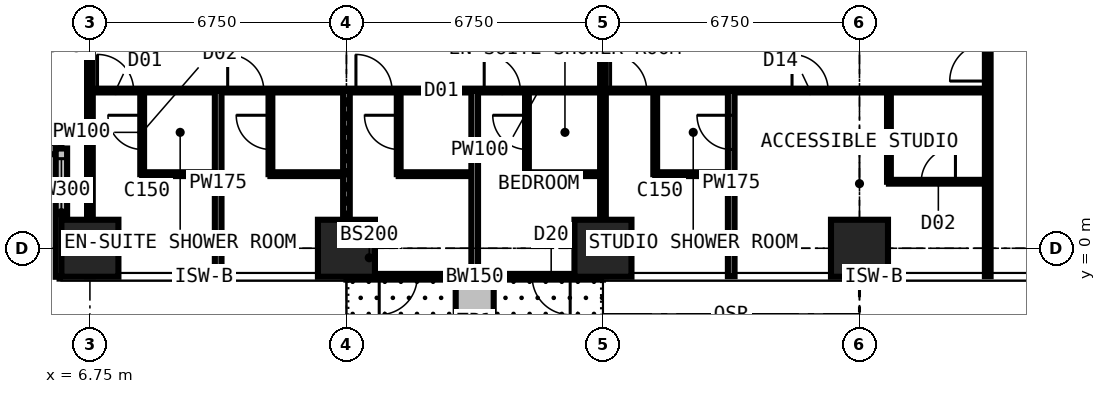
"""IFC4 building model, lengths in metres.
Left out: names, types, materials, properties, quantities, classifications, styles, units other than length and angle.
Written with IfcOpenShell. Run it as: python <this file> out.ifc"""

import sys

from ifc_helpers import new_model, si_unit, direction, frame, frame_2d, origin, origin_2d, place, context, subcontext, project, spatial, rectangle, extrude, element, fill, save


model = new_model("IFC4")
c1 = context("Model", 3, precision=1e-05, world=origin(), true_north=direction((0.0, 1.0)))
c2 = subcontext(c1, "Body", "Model", "MODEL_VIEW")
j1 = project(units=[si_unit("LENGTHUNIT", "METRE"), si_unit("PLANEANGLEUNIT", "RADIAN")], contexts=[c1])
p1 = place(None, origin())
s1 = spatial("IfcSite", under=j1, at=p1, CompositionType="ELEMENT")
p2 = place(p1, origin())
s2 = spatial("IfcBuilding", under=s1, at=p2, CompositionType="ELEMENT")
p3 = place(p2, frame((0.0, 0.0, 116.1)))
s3 = spatial("IfcBuildingStorey", under=s2, at=p3, CompositionType="ELEMENT", Elevation=116.1)
for number, where, z_axis, x_axis in (
    (1, (6.75, 0.0, 0.0), (0.0, 0.0, 1.0), (1.0, 0.0, 0.0)),
    (2, (13.5, 0.0, 0.0), (0.0, 0.0, 1.0), (1.0, 0.0, 0.0)),
    (3, (20.25, 0.0, 0.0), (0.0, 0.0, 1.0), (1.0, 0.0, 0.0)),
    (4, (27.0, 0.0, 0.0), (0.0, 0.0, 1.0), (1.0, 0.0, 0.0)),
):
    element("IfcColumn", number, at=place(p3, frame(where, z_axis=z_axis, x_axis=x_axis)), inside=s3, PredefinedType="COLUMN", context=c2, shape_type="SweptSolid", body=[
        extrude(rectangle(XDim=1.5, YDim=1.5, at=origin_2d()), origin(), (0.0, 0.0, 1.0), 3.6),
    ])
p4 = place(p3, frame((2.625, 2.625, 0.0), z_axis=(0.0, 0.0, 1.0), x_axis=(1.0, 0.0, 0.0)))
e5 = element("IfcWall", 5, at=p4, inside=s3, PredefinedType="SOLIDWALL", context=c2, shape_type="SweptSolid", body=[
    extrude(rectangle(XDim=3.375, YDim=0.3, at=frame_2d((1.688, 0.0))), origin(), (0.0, 0.0, 1.0), 3.375),
])
p5 = place(p4, frame((0.788, 0.0, 0.6)))
e6 = element("IfcOpeningElement", 6, at=p5, cuts=e5, PredefinedType="OPENING", context=c2, shape_type="SweptSolid", body=[
    extrude(rectangle(XDim=1.8, YDim=2.1, at=frame_2d((0.9, 1.05))), frame((0.0, 0.16, 0.0), z_axis=(0.0, -1.0, 0.0), x_axis=(1.0, 0.0, 0.0)), (0.0, 0.0, 1.0), 0.32),
])
p6 = place(p3, frame((6.0, 2.625, 0.0), z_axis=(0.0, 0.0, 1.0), x_axis=(0.0, -1.0, 0.0)))
e7 = element("IfcWall", 7, at=p6, inside=s3, PredefinedType="SOLIDWALL", context=c2, shape_type="SweptSolid", body=[
    extrude(rectangle(XDim=3.375, YDim=0.3, at=frame_2d((1.688, 0.0))), origin(), (0.0, 0.0, 1.0), 3.375),
])
p7 = place(p6, frame((0.268, 0.0, 0.9)))
e8 = element("IfcOpeningElement", 8, at=p7, cuts=e7, PredefinedType="OPENING", context=c2, shape_type="SweptSolid", body=[
    extrude(rectangle(XDim=1.5, YDim=1.8, at=frame_2d((0.75, 0.9))), frame((0.0, 0.16, 0.0), z_axis=(0.0, -1.0, 0.0), x_axis=(1.0, 0.0, 0.0)), (0.0, 0.0, 1.0), 0.32),
])
p8 = place(p3, frame((20.25, -0.75, 0.0), z_axis=(0.0, 0.0, 1.0), x_axis=(-1.0, 0.0, 0.0)))
e9 = element("IfcWall", 9, at=p8, inside=s3, PredefinedType="SOLIDWALL", context=c2, shape_type="SweptSolid", body=[
    extrude(rectangle(XDim=6.75, YDim=0.15, at=frame_2d((3.375, 0.0))), origin(), (0.0, 0.0, 1.0), 3.375),
])
p9 = place(p8, frame((0.863, 0.0, 0.0)))
e10 = element("IfcOpeningElement", 10, at=p9, cuts=e9, PredefinedType="OPENING", context=c2, shape_type="SweptSolid", body=[
    extrude(rectangle(XDim=1.0, YDim=2.2, at=frame_2d((0.5, 1.1))), frame((0.0, 0.085, 0.0), z_axis=(0.0, -1.0, 0.0), x_axis=(1.0, 0.0, 0.0)), (0.0, 0.0, 1.0), 0.17),
])
p10 = place(p8, frame((1.975, 0.0, 0.9)))
e11 = element("IfcOpeningElement", 11, at=p10, cuts=e9, PredefinedType="OPENING", context=c2, shape_type="SweptSolid", body=[
    extrude(rectangle(XDim=1.2, YDim=1.8, at=frame_2d((0.6, 0.9))), frame((0.0, 0.085, 0.0), z_axis=(0.0, -1.0, 0.0), x_axis=(1.0, 0.0, 0.0)), (0.0, 0.0, 1.0), 0.17),
])
p11 = place(p8, frame((4.887, 0.0, 0.0)))
e12 = element("IfcOpeningElement", 12, at=p11, cuts=e9, PredefinedType="OPENING", context=c2, shape_type="SweptSolid", body=[
    extrude(rectangle(XDim=1.0, YDim=2.2, at=frame_2d((0.5, 1.1))), frame((0.0, 0.085, 0.0), z_axis=(0.0, -1.0, 0.0), x_axis=(1.0, 0.0, 0.0)), (0.0, 0.0, 1.0), 0.17),
])
p12 = place(p8, frame((3.575, 0.0, 0.9)))
e13 = element("IfcOpeningElement", 13, at=p12, cuts=e9, PredefinedType="OPENING", context=c2, shape_type="SweptSolid", body=[
    extrude(rectangle(XDim=1.2, YDim=1.8, at=frame_2d((0.6, 0.9))), frame((0.0, 0.085, 0.0), z_axis=(0.0, -1.0, 0.0), x_axis=(1.0, 0.0, 0.0)), (0.0, 0.0, 1.0), 0.17),
])
p13 = place(p3, frame((16.875, -0.85, 0.0), z_axis=(0.0, 0.0, 1.0), x_axis=(0.0, -1.0, 0.0)))
e14 = element("IfcWall", 14, at=p13, inside=s3, PredefinedType="USERDEFINED", context=c2, shape_type="SweptSolid", body=[
    extrude(rectangle(XDim=2.2, YDim=1.0, at=frame_2d((1.1, 0.0))), origin(), (0.0, 0.0, 1.0), 0.9),
])
p14 = place(p3, frame((6.75, -0.734, 0.0), z_axis=(0.0, 0.0, 1.0), x_axis=(0.0, 1.0, 0.0)))
e15 = element("IfcWall", 15, at=p14, inside=s3, PredefinedType="PARTITIONING", context=c2, shape_type="SweptSolid", body=[
    extrude(rectangle(XDim=10.859, YDim=0.15, at=frame_2d((5.429, 0.0))), origin(), (0.0, 0.0, 1.0), 2.877),
])
p15 = place(p3, frame((6.75, 4.15, 0.0), z_axis=(0.0, 0.0, 1.0), x_axis=(1.0, 0.0, 0.0)))
e16 = element("IfcWall", 16, at=p15, inside=s3, PredefinedType="PARTITIONING", context=c2, shape_type="SweptSolid", body=[
    extrude(rectangle(XDim=23.625, YDim=0.1, at=frame_2d((11.812, 0.0))), origin(), (0.0, 0.0, 1.0), 3.375),
])
p16 = place(p15, frame((0.2, 0.0, 0.0)))
e17 = element("IfcOpeningElement", 17, at=p16, cuts=e16, PredefinedType="OPENING", context=c2, shape_type="SweptSolid", body=[
    extrude(rectangle(XDim=0.95, YDim=2.2, at=frame_2d((0.475, 1.1))), frame((0.0, 0.06, 0.0), z_axis=(0.0, -1.0, 0.0), x_axis=(1.0, 0.0, 0.0)), (0.0, 0.0, 1.0), 0.12),
])
p17 = place(p15, frame((3.625, 0.0, 0.0)))
e18 = element("IfcOpeningElement", 18, at=p17, cuts=e16, PredefinedType="OPENING", context=c2, shape_type="SweptSolid", body=[
    extrude(rectangle(XDim=0.95, YDim=2.2, at=frame_2d((0.475, 1.1))), frame((0.0, 0.06, 0.0), z_axis=(0.0, -1.0, 0.0), x_axis=(1.0, 0.0, 0.0)), (0.0, 0.0, 1.0), 0.12),
])
p18 = place(p15, frame((7.0, 0.0, 0.0)))
e19 = element("IfcOpeningElement", 19, at=p18, cuts=e16, PredefinedType="OPENING", context=c2, shape_type="SweptSolid", body=[
    extrude(rectangle(XDim=0.95, YDim=2.2, at=frame_2d((0.475, 1.1))), frame((0.0, 0.06, 0.0), z_axis=(0.0, -1.0, 0.0), x_axis=(1.0, 0.0, 0.0)), (0.0, 0.0, 1.0), 0.12),
])
p19 = place(p15, frame((10.375, 0.0, 0.0)))
e20 = element("IfcOpeningElement", 20, at=p19, cuts=e16, PredefinedType="OPENING", context=c2, shape_type="SweptSolid", body=[
    extrude(rectangle(XDim=0.95, YDim=2.2, at=frame_2d((0.475, 1.1))), frame((0.0, 0.06, 0.0), z_axis=(0.0, -1.0, 0.0), x_axis=(1.0, 0.0, 0.0)), (0.0, 0.0, 1.0), 0.12),
])
p20 = place(p15, frame((18.475, 0.0, 0.0)))
e21 = element("IfcOpeningElement", 21, at=p20, cuts=e16, PredefinedType="OPENING", context=c2, shape_type="SweptSolid", body=[
    extrude(rectangle(XDim=0.95, YDim=2.2, at=frame_2d((0.475, 1.1))), frame((0.0, 0.06, 0.0), z_axis=(0.0, -1.0, 0.0), x_axis=(1.0, 0.0, 0.0)), (0.0, 0.0, 1.0), 0.12),
])
p21 = place(p15, frame((13.7, 0.0, 0.0)))
e22 = element("IfcOpeningElement", 22, at=p21, cuts=e16, PredefinedType="OPENING", context=c2, shape_type="SweptSolid", body=[
    extrude(rectangle(XDim=0.95, YDim=2.2, at=frame_2d((0.475, 1.1))), frame((0.0, 0.06, 0.0), z_axis=(0.0, -1.0, 0.0), x_axis=(1.0, 0.0, 0.0)), (0.0, 0.0, 1.0), 0.12),
])
p22 = place(p3, frame((8.125, 1.95, 0.0), z_axis=(0.0, 0.0, 1.0), x_axis=(0.0, 1.0, 0.0)))
e23 = element("IfcWall", 23, at=p22, inside=s3, PredefinedType="PARTITIONING", context=c2, shape_type="SweptSolid", body=[
    extrude(rectangle(XDim=2.2, YDim=0.1, at=frame_2d((1.1, 0.0))), origin(), (0.0, 0.0, 1.0), 3.375),
])
p23 = place(p22, frame((0.65, 0.0, 0.0)))
e24 = element("IfcOpeningElement", 24, at=p23, cuts=e23, PredefinedType="OPENING", context=c2, shape_type="SweptSolid", body=[
    extrude(rectangle(XDim=0.9, YDim=2.2, at=frame_2d((0.45, 1.1))), frame((0.0, 0.06, 0.0), z_axis=(0.0, -1.0, 0.0), x_axis=(1.0, 0.0, 0.0)), (0.0, 0.0, 1.0), 0.12),
])
p24 = place(p3, frame((8.125, 1.95, 0.0), z_axis=(0.0, 0.0, 1.0), x_axis=(1.0, 0.0, 0.0)))
e25 = element("IfcWall", 25, at=p24, inside=s3, PredefinedType="PARTITIONING", context=c2, shape_type="SweptSolid", body=[
    extrude(rectangle(XDim=2.0, YDim=0.1, at=frame_2d((1.0, 0.0))), origin(), (0.0, 0.0, 1.0), 3.375),
])
p25 = place(p3, frame((10.125, -0.734, 0.0), z_axis=(0.0, 0.0, 1.0), x_axis=(0.0, 1.0, 0.0)))
e26 = element("IfcWall", 26, at=p25, inside=s3, PredefinedType="PARTITIONING", context=c2, shape_type="SweptSolid", body=[
    extrude(rectangle(XDim=4.884, YDim=0.175, at=frame_2d((2.442, 0.0))), origin(), (0.0, 0.0, 1.0), 3.375),
])
p26 = place(p3, frame((11.5, 1.95, 0.0), z_axis=(0.0, 0.0, 1.0), x_axis=(0.0, 1.0, 0.0)))
e27 = element("IfcWall", 27, at=p26, inside=s3, PredefinedType="PARTITIONING", context=c2, shape_type="SweptSolid", body=[
    extrude(rectangle(XDim=2.2, YDim=0.1, at=frame_2d((1.1, 0.0))), origin(), (0.0, 0.0, 1.0), 3.375),
])
p27 = place(p26, frame((0.65, 0.0, 0.0)))
e28 = element("IfcOpeningElement", 28, at=p27, cuts=e27, PredefinedType="OPENING", context=c2, shape_type="SweptSolid", body=[
    extrude(rectangle(XDim=0.9, YDim=2.2, at=frame_2d((0.45, 1.1))), frame((0.0, 0.06, 0.0), z_axis=(0.0, -1.0, 0.0), x_axis=(1.0, 0.0, 0.0)), (0.0, 0.0, 1.0), 0.12),
])
p28 = place(p3, frame((11.5, 1.95, 0.0), z_axis=(0.0, 0.0, 1.0), x_axis=(1.0, 0.0, 0.0)))
e29 = element("IfcWall", 29, at=p28, inside=s3, PredefinedType="PARTITIONING", context=c2, shape_type="SweptSolid", body=[
    extrude(rectangle(XDim=2.0, YDim=0.1, at=frame_2d((1.0, 0.0))), origin(), (0.0, 0.0, 1.0), 3.375),
])
p29 = place(p3, frame((13.5, -0.734, 0.0), z_axis=(0.0, 0.0, 1.0), x_axis=(0.0, 1.0, 0.0)))
e30 = element("IfcWall", 30, at=p29, inside=s3, PredefinedType="PARTITIONING", context=c2, shape_type="SweptSolid", body=[
    extrude(rectangle(XDim=4.884, YDim=0.175, at=frame_2d((2.442, 0.0))), origin(), (0.0, 0.0, 1.0), 2.877),
])
p30 = place(p3, frame((14.875, 1.95, 0.0), z_axis=(0.0, 0.0, 1.0), x_axis=(0.0, 1.0, 0.0)))
e31 = element("IfcWall", 31, at=p30, inside=s3, PredefinedType="PARTITIONING", context=c2, shape_type="SweptSolid", body=[
    extrude(rectangle(XDim=2.2, YDim=0.1, at=frame_2d((1.1, 0.0))), origin(), (0.0, 0.0, 1.0), 3.375),
])
p31 = place(p30, frame((0.65, 0.0, 0.0)))
e32 = element("IfcOpeningElement", 32, at=p31, cuts=e31, PredefinedType="OPENING", context=c2, shape_type="SweptSolid", body=[
    extrude(rectangle(XDim=0.9, YDim=2.2, at=frame_2d((0.45, 1.1))), frame((0.0, 0.06, 0.0), z_axis=(0.0, -1.0, 0.0), x_axis=(1.0, 0.0, 0.0)), (0.0, 0.0, 1.0), 0.12),
])
p32 = place(p3, frame((14.875, 1.95, 0.0), z_axis=(0.0, 0.0, 1.0), x_axis=(1.0, 0.0, 0.0)))
e33 = element("IfcWall", 33, at=p32, inside=s3, PredefinedType="PARTITIONING", context=c2, shape_type="SweptSolid", body=[
    extrude(rectangle(XDim=2.0, YDim=0.1, at=frame_2d((1.0, 0.0))), origin(), (0.0, 0.0, 1.0), 3.375),
])
p33 = place(p3, frame((16.875, -0.734, 0.0), z_axis=(0.0, 0.0, 1.0), x_axis=(0.0, 1.0, 0.0)))
e34 = element("IfcWall", 34, at=p33, inside=s3, PredefinedType="PARTITIONING", context=c2, shape_type="SweptSolid", body=[
    extrude(rectangle(XDim=4.884, YDim=0.175, at=frame_2d((2.442, 0.0))), origin(), (0.0, 0.0, 1.0), 3.375),
])
p34 = place(p3, frame((18.25, 1.95, 0.0), z_axis=(0.0, 0.0, 1.0), x_axis=(0.0, 1.0, 0.0)))
e35 = element("IfcWall", 35, at=p34, inside=s3, PredefinedType="PARTITIONING", context=c2, shape_type="SweptSolid", body=[
    extrude(rectangle(XDim=2.2, YDim=0.1, at=frame_2d((1.1, 0.0))), origin(), (0.0, 0.0, 1.0), 3.375),
])
p35 = place(p34, frame((0.65, 0.0, 0.0)))
e36 = element("IfcOpeningElement", 36, at=p35, cuts=e35, PredefinedType="OPENING", context=c2, shape_type="SweptSolid", body=[
    extrude(rectangle(XDim=0.9, YDim=2.2, at=frame_2d((0.45, 1.1))), frame((0.0, 0.06, 0.0), z_axis=(0.0, -1.0, 0.0), x_axis=(1.0, 0.0, 0.0)), (0.0, 0.0, 1.0), 0.12),
])
p36 = place(p3, frame((18.25, 1.95, 0.0), z_axis=(0.0, 0.0, 1.0), x_axis=(1.0, 0.0, 0.0)))
e37 = element("IfcWall", 37, at=p36, inside=s3, PredefinedType="PARTITIONING", context=c2, shape_type="SweptSolid", body=[
    extrude(rectangle(XDim=2.0, YDim=0.1, at=frame_2d((1.0, 0.0))), origin(), (0.0, 0.0, 1.0), 3.375),
])
p37 = place(p3, frame((20.25, -0.734, 0.0), z_axis=(0.0, 0.0, 1.0), x_axis=(0.0, 1.0, 0.0)))
e38 = element("IfcWall", 38, at=p37, inside=s3, PredefinedType="PARTITIONING", context=c2, shape_type="SweptSolid", body=[
    extrude(rectangle(XDim=12.034, YDim=0.15, at=frame_2d((6.017, 0.0))), origin(), (0.0, 0.0, 1.0), 2.61),
])
p38 = place(p3, frame((21.625, 1.95, 0.0), z_axis=(0.0, 0.0, 1.0), x_axis=(0.0, 1.0, 0.0)))
e39 = element("IfcWall", 39, at=p38, inside=s3, PredefinedType="PARTITIONING", context=c2, shape_type="SweptSolid", body=[
    extrude(rectangle(XDim=2.2, YDim=0.1, at=frame_2d((1.1, 0.0))), origin(), (0.0, 0.0, 1.0), 3.375),
])
p39 = place(p3, frame((21.625, 1.95, 0.0), z_axis=(0.0, 0.0, 1.0), x_axis=(1.0, 0.0, 0.0)))
e40 = element("IfcWall", 40, at=p39, inside=s3, PredefinedType="PARTITIONING", context=c2, shape_type="SweptSolid", body=[
    extrude(rectangle(XDim=2.0, YDim=0.1, at=frame_2d((1.0, 0.0))), origin(), (0.0, 0.0, 1.0), 3.375),
])
p40 = place(p3, frame((23.625, -0.734, 0.0), z_axis=(0.0, 0.0, 1.0), x_axis=(0.0, 1.0, 0.0)))
e41 = element("IfcWall", 41, at=p40, inside=s3, PredefinedType="PARTITIONING", context=c2, shape_type="SweptSolid", body=[
    extrude(rectangle(XDim=4.884, YDim=0.175, at=frame_2d((2.442, 0.0))), origin(), (0.0, 0.0, 1.0), 3.375),
])
p41 = place(p40, frame((3.334, 0.0, 0.0)))
e42 = element("IfcOpeningElement", 42, at=p41, cuts=e41, PredefinedType="OPENING", context=c2, shape_type="SweptSolid", body=[
    extrude(rectangle(XDim=0.9, YDim=2.2, at=frame_2d((0.45, 1.1))), frame((0.0, 0.097, 0.0), z_axis=(0.0, -1.0, 0.0), x_axis=(1.0, 0.0, 0.0)), (0.0, 0.0, 1.0), 0.195),
])
p42 = place(p3, frame((27.775, 1.75, 0.0), z_axis=(0.0, 0.0, 1.0), x_axis=(0.0, 1.0, 0.0)))
e43 = element("IfcWall", 43, at=p42, inside=s3, PredefinedType="PARTITIONING", context=c2, shape_type="SweptSolid", body=[
    extrude(rectangle(XDim=2.4, YDim=0.1, at=frame_2d((1.2, 0.0))), origin(), (0.0, 0.0, 1.0), 3.375),
])
p43 = place(p3, frame((27.775, 1.75, 0.0), z_axis=(0.0, 0.0, 1.0), x_axis=(1.0, 0.0, 0.0)))
e44 = element("IfcWall", 44, at=p43, inside=s3, PredefinedType="PARTITIONING", context=c2, shape_type="SweptSolid", body=[
    extrude(rectangle(XDim=2.6, YDim=0.1, at=frame_2d((1.3, 0.0))), origin(), (0.0, 0.0, 1.0), 3.375),
])
p44 = place(p43, frame((0.85, 0.0, 0.0)))
e45 = element("IfcOpeningElement", 45, at=p44, cuts=e44, PredefinedType="OPENING", context=c2, shape_type="SweptSolid", body=[
    extrude(rectangle(XDim=0.9, YDim=2.2, at=frame_2d((0.45, 1.1))), frame((0.0, 0.06, 0.0), z_axis=(0.0, -1.0, 0.0), x_axis=(1.0, 0.0, 0.0)), (0.0, 0.0, 1.0), 0.12),
])
p45 = place(p3, frame((30.375, -0.734, 0.0), z_axis=(0.0, 0.0, 1.0), x_axis=(0.0, 1.0, 0.0)))
e46 = element("IfcWall", 46, at=p45, inside=s3, PredefinedType="PARTITIONING", context=c2, shape_type="SweptSolid", body=[
    extrude(rectangle(XDim=12.034, YDim=0.15, at=frame_2d((6.017, 0.0))), origin(), (0.0, 0.0, 1.0), 3.375),
])
p46 = place(p45, frame((5.134, 0.0, 0.0)))
e47 = element("IfcOpeningElement", 47, at=p46, cuts=e46, PredefinedType="OPENING", context=c2, shape_type="SweptSolid", body=[
    extrude(rectangle(XDim=1.0, YDim=2.2, at=frame_2d((0.5, 1.1))), frame((0.0, 0.085, 0.0), z_axis=(0.0, -1.0, 0.0), x_axis=(1.0, 0.0, 0.0)), (0.0, 0.0, 1.0), 0.17),
])
p47 = place(p7, origin())
e48 = element("IfcWindow", 48, at=p47, inside=s3, PartitioningType="SINGLE_PANEL", PredefinedType="WINDOW", context=c2, shape_type="SweptSolid", body=[
    extrude(rectangle(XDim=1.5, YDim=1.8, at=frame_2d((0.75, 0.9))), frame((0.0, 0.03, 0.0), z_axis=(0.0, -1.0, 0.0), x_axis=(1.0, 0.0, 0.0)), (0.0, 0.0, 1.0), 0.06),
])
fill(e8, e48)
p48 = place(p9, origin())
e49 = element("IfcDoor", 49, at=p48, inside=s3, OperationType="SINGLE_SWING_LEFT", PredefinedType="DOOR", context=c2, shape_type="SweptSolid", body=[
    extrude(rectangle(XDim=1.0, YDim=2.2, at=frame_2d((0.5, 1.1))), frame((0.0, 0.025, 0.0), z_axis=(0.0, -1.0, 0.0), x_axis=(1.0, 0.0, 0.0)), (0.0, 0.0, 1.0), 0.05),
])
fill(e10, e49)
p49 = place(p10, origin())
e50 = element("IfcWindow", 50, at=p49, inside=s3, PartitioningType="SINGLE_PANEL", PredefinedType="WINDOW", context=c2, shape_type="SweptSolid", body=[
    extrude(rectangle(XDim=1.2, YDim=1.8, at=frame_2d((0.6, 0.9))), frame((0.0, 0.03, 0.0), z_axis=(0.0, -1.0, 0.0), x_axis=(1.0, 0.0, 0.0)), (0.0, 0.0, 1.0), 0.06),
])
fill(e11, e50)
p50 = place(p11, origin())
e51 = element("IfcDoor", 51, at=p50, inside=s3, OperationType="SINGLE_SWING_RIGHT", PredefinedType="DOOR", context=c2, shape_type="SweptSolid", body=[
    extrude(rectangle(XDim=1.0, YDim=2.2, at=frame_2d((0.5, 1.1))), frame((0.0, 0.025, 0.0), z_axis=(0.0, -1.0, 0.0), x_axis=(1.0, 0.0, 0.0)), (0.0, 0.0, 1.0), 0.05),
])
fill(e12, e51)
p51 = place(p12, origin())
e52 = element("IfcWindow", 52, at=p51, inside=s3, PartitioningType="SINGLE_PANEL", PredefinedType="WINDOW", context=c2, shape_type="SweptSolid", body=[
    extrude(rectangle(XDim=1.2, YDim=1.8, at=frame_2d((0.6, 0.9))), frame((0.0, 0.03, 0.0), z_axis=(0.0, -1.0, 0.0), x_axis=(1.0, 0.0, 0.0)), (0.0, 0.0, 1.0), 0.06),
])
fill(e13, e52)
p52 = place(p16, origin())
e53 = element("IfcDoor", 53, at=p52, inside=s3, OperationType="SINGLE_SWING_LEFT", PredefinedType="DOOR", context=c2, shape_type="SweptSolid", body=[
    extrude(rectangle(XDim=0.95, YDim=2.2, at=frame_2d((0.475, 1.1))), frame((0.0, 0.025, 0.0), z_axis=(0.0, -1.0, 0.0), x_axis=(1.0, 0.0, 0.0)), (0.0, 0.0, 1.0), 0.05),
])
fill(e17, e53)
p53 = place(p23, origin())
e54 = element("IfcDoor", 54, at=p53, inside=s3, OperationType="SINGLE_SWING_RIGHT", PredefinedType="DOOR", context=c2, shape_type="SweptSolid", body=[
    extrude(rectangle(XDim=0.9, YDim=2.2, at=frame_2d((0.45, 1.1))), frame((0.0, 0.025, 0.0), z_axis=(0.0, -1.0, 0.0), x_axis=(1.0, 0.0, 0.0)), (0.0, 0.0, 1.0), 0.05),
])
fill(e24, e54)
p54 = place(p17, origin())
e55 = element("IfcDoor", 55, at=p54, inside=s3, OperationType="SINGLE_SWING_LEFT", PredefinedType="DOOR", context=c2, shape_type="SweptSolid", body=[
    extrude(rectangle(XDim=0.95, YDim=2.2, at=frame_2d((0.475, 1.1))), frame((0.0, 0.025, 0.0), z_axis=(0.0, -1.0, 0.0), x_axis=(1.0, 0.0, 0.0)), (0.0, 0.0, 1.0), 0.05),
])
fill(e18, e55)
p55 = place(p27, origin())
e56 = element("IfcDoor", 56, at=p55, inside=s3, OperationType="SINGLE_SWING_RIGHT", PredefinedType="DOOR", context=c2, shape_type="SweptSolid", body=[
    extrude(rectangle(XDim=0.9, YDim=2.2, at=frame_2d((0.45, 1.1))), frame((0.0, 0.025, 0.0), z_axis=(0.0, -1.0, 0.0), x_axis=(1.0, 0.0, 0.0)), (0.0, 0.0, 1.0), 0.05),
])
fill(e28, e56)
p56 = place(p18, origin())
e57 = element("IfcDoor", 57, at=p56, inside=s3, OperationType="SINGLE_SWING_LEFT", PredefinedType="DOOR", context=c2, shape_type="SweptSolid", body=[
    extrude(rectangle(XDim=0.95, YDim=2.2, at=frame_2d((0.475, 1.1))), frame((0.0, 0.025, 0.0), z_axis=(0.0, -1.0, 0.0), x_axis=(1.0, 0.0, 0.0)), (0.0, 0.0, 1.0), 0.05),
])
fill(e19, e57)
p57 = place(p31, origin())
e58 = element("IfcDoor", 58, at=p57, inside=s3, OperationType="SINGLE_SWING_RIGHT", PredefinedType="DOOR", context=c2, shape_type="SweptSolid", body=[
    extrude(rectangle(XDim=0.9, YDim=2.2, at=frame_2d((0.45, 1.1))), frame((0.0, 0.025, 0.0), z_axis=(0.0, -1.0, 0.0), x_axis=(1.0, 0.0, 0.0)), (0.0, 0.0, 1.0), 0.05),
])
fill(e32, e58)
p58 = place(p19, origin())
e59 = element("IfcDoor", 59, at=p58, inside=s3, OperationType="SINGLE_SWING_LEFT", PredefinedType="DOOR", context=c2, shape_type="SweptSolid", body=[
    extrude(rectangle(XDim=0.95, YDim=2.2, at=frame_2d((0.475, 1.1))), frame((0.0, 0.025, 0.0), z_axis=(0.0, -1.0, 0.0), x_axis=(1.0, 0.0, 0.0)), (0.0, 0.0, 1.0), 0.05),
])
fill(e20, e59)
p59 = place(p35, origin())
e60 = element("IfcDoor", 60, at=p59, inside=s3, OperationType="SINGLE_SWING_RIGHT", PredefinedType="DOOR", context=c2, shape_type="SweptSolid", body=[
    extrude(rectangle(XDim=0.9, YDim=2.2, at=frame_2d((0.45, 1.1))), frame((0.0, 0.025, 0.0), z_axis=(0.0, -1.0, 0.0), x_axis=(1.0, 0.0, 0.0)), (0.0, 0.0, 1.0), 0.05),
])
fill(e36, e60)
p60 = place(p20, origin())
e61 = element("IfcDoor", 61, at=p60, inside=s3, OperationType="SINGLE_SWING_LEFT", PredefinedType="DOOR", context=c2, shape_type="SweptSolid", body=[
    extrude(rectangle(XDim=0.95, YDim=2.2, at=frame_2d((0.475, 1.1))), frame((0.0, 0.025, 0.0), z_axis=(0.0, -1.0, 0.0), x_axis=(1.0, 0.0, 0.0)), (0.0, 0.0, 1.0), 0.05),
])
fill(e21, e61)
p61 = place(p44, origin())
e62 = element("IfcDoor", 62, at=p61, inside=s3, OperationType="SINGLE_SWING_RIGHT", PredefinedType="DOOR", context=c2, shape_type="SweptSolid", body=[
    extrude(rectangle(XDim=0.9, YDim=2.2, at=frame_2d((0.45, 1.1))), frame((0.0, 0.025, 0.0), z_axis=(0.0, -1.0, 0.0), x_axis=(1.0, 0.0, 0.0)), (0.0, 0.0, 1.0), 0.05),
])
fill(e45, e62)
p62 = place(p21, origin())
e63 = element("IfcDoor", 63, at=p62, inside=s3, OperationType="SINGLE_SWING_LEFT", PredefinedType="DOOR", context=c2, shape_type="SweptSolid", body=[
    extrude(rectangle(XDim=0.95, YDim=2.2, at=frame_2d((0.475, 1.1))), frame((0.0, 0.025, 0.0), z_axis=(0.0, -1.0, 0.0), x_axis=(1.0, 0.0, 0.0)), (0.0, 0.0, 1.0), 0.05),
])
fill(e22, e63)
p63 = place(p41, origin())
e64 = element("IfcDoor", 64, at=p63, inside=s3, OperationType="SINGLE_SWING_RIGHT", PredefinedType="DOOR", context=c2, shape_type="SweptSolid", body=[
    extrude(rectangle(XDim=0.9, YDim=2.2, at=frame_2d((0.45, 1.1))), frame((0.0, 0.025, 0.0), z_axis=(0.0, -1.0, 0.0), x_axis=(1.0, 0.0, 0.0)), (0.0, 0.0, 1.0), 0.05),
])
fill(e42, e64)
p64 = place(p46, origin())
e65 = element("IfcDoor", 65, at=p64, inside=s3, OperationType="SINGLE_SWING_LEFT", PredefinedType="DOOR", context=c2, shape_type="SweptSolid", body=[
    extrude(rectangle(XDim=1.0, YDim=2.2, at=frame_2d((0.5, 1.1))), frame((0.0, 0.025, 0.0), z_axis=(0.0, -1.0, 0.0), x_axis=(1.0, 0.0, 0.0)), (0.0, 0.0, 1.0), 0.05),
])
fill(e47, e65)
save(model, sys.argv[1])
